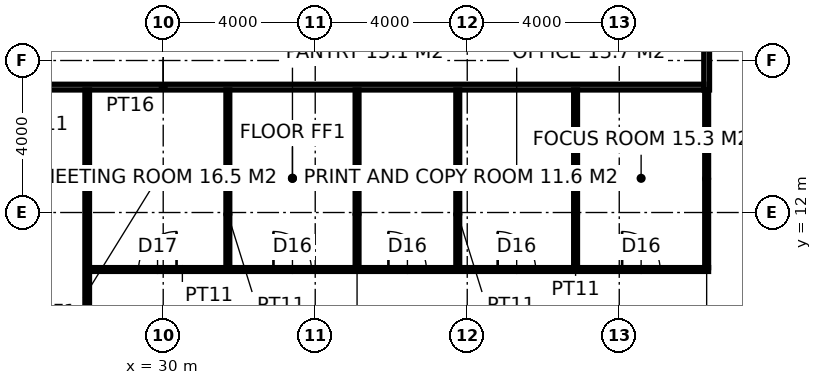
"""IFC4 building model, lengths in metres.
Left out: names, types, materials, properties, quantities, classifications, styles, units other than length and angle.
Written with IfcOpenShell. Run it as: python <this file> out.ifc"""

import sys

from ifc_helpers import new_model, si_unit, direction, frame, frame_2d, origin, place, context, subcontext, project, spatial, rectangle, extrude, element, fill, save


model = new_model("IFC4")
c1 = context("Model", 3, precision=1e-05, world=origin(), true_north=direction((0.0, 1.0)))
c2 = subcontext(c1, "Body", "Model", "MODEL_VIEW")
j1 = project(units=[si_unit("LENGTHUNIT", "METRE"), si_unit("PLANEANGLEUNIT", "RADIAN")], contexts=[c1])
p1 = place(None, origin())
s1 = spatial("IfcSite", under=j1, at=p1, CompositionType="ELEMENT")
p2 = place(p1, origin())
s2 = spatial("IfcBuilding", under=s1, at=p2, CompositionType="ELEMENT")
p3 = place(p2, frame((0.0, 0.0, 19.0)))
s3 = spatial("IfcBuildingStorey", under=s2, at=p3, CompositionType="ELEMENT", Elevation=19.0)
p4 = place(p3, frame((44.3, 15.225, 0.0), z_axis=(0.0, 0.0, 1.0), x_axis=(0.0, 1.0, 0.0)))
e1 = element("IfcWall", 1, at=p4, inside=s3, PredefinedType="PARTITIONING", context=c2, shape_type="SweptSolid", body=[
    extrude(rectangle(XDim=23.55, YDim=0.15, at=frame_2d((11.775, 0.0))), origin(), (0.0, 0.0, 1.0), 3.85),
])
p5 = place(p4, frame((5.575, 0.0, 0.0)))
e2 = element("IfcOpeningElement", 2, at=p5, cuts=e1, PredefinedType="OPENING", context=c2, shape_type="SweptSolid", body=[
    extrude(rectangle(XDim=1.8, YDim=2.4, at=frame_2d((0.9, 1.2))), frame((0.0, 0.085, 0.0), z_axis=(0.0, -1.0, 0.0), x_axis=(1.0, 0.0, 0.0)), (0.0, 0.0, 1.0), 0.17),
])
p6 = place(p4, frame((16.825, 0.0, 0.0)))
e3 = element("IfcOpeningElement", 3, at=p6, cuts=e1, PredefinedType="OPENING", context=c2, shape_type="SweptSolid", body=[
    extrude(rectangle(XDim=1.8, YDim=2.4, at=frame_2d((0.9, 1.2))), frame((0.0, 0.085, 0.0), z_axis=(0.0, -1.0, 0.0), x_axis=(1.0, 0.0, 0.0)), (0.0, 0.0, 1.0), 0.17),
])
p7 = place(p3, frame((15.775, 15.3, 0.0), z_axis=(0.0, 0.0, 1.0), x_axis=(1.0, 0.0, 0.0)))
e4 = element("IfcWall", 4, at=p7, inside=s3, PredefinedType="PARTITIONING", context=c2, shape_type="SweptSolid", body=[
    extrude(rectangle(XDim=28.45, YDim=0.15, at=frame_2d((14.225, 0.0))), origin(), (0.0, 0.0, 1.0), 3.85),
])
p8 = place(p3, frame((28.0, -3.7, 0.0), z_axis=(0.0, 0.0, 1.0), x_axis=(0.0, 1.0, 0.0)))
e5 = element("IfcWall", 5, at=p8, inside=s3, PredefinedType="PARTITIONING", context=c2, shape_type="SweptSolid", body=[
    extrude(rectangle(XDim=18.925, YDim=0.12, at=frame_2d((9.462, 0.0))), origin(), (0.0, 0.0, 1.0), 3.85),
])
p9 = place(p3, frame((28.061, 10.5, 0.0), z_axis=(0.0, 0.0, 1.0), x_axis=(1.0, 0.0, 0.0)))
e6 = element("IfcWall", 6, at=p9, inside=s3, PredefinedType="PARTITIONING", context=c2, shape_type="SweptSolid", body=[
    extrude(rectangle(XDim=16.289, YDim=0.1, at=frame_2d((8.145, 0.0))), origin(), (0.0, 0.0, 1.0), 3.85),
])
p10 = place(p9, frame((1.29, 0.0, 0.0)))
e7 = element("IfcOpeningElement", 7, at=p10, cuts=e6, PredefinedType="OPENING", context=c2, shape_type="SweptSolid", body=[
    extrude(rectangle(XDim=1.0, YDim=2.2, at=frame_2d((0.5, 1.1))), frame((0.0, 0.06, 0.0), z_axis=(0.0, -1.0, 0.0), x_axis=(1.0, 0.0, 0.0)), (0.0, 0.0, 1.0), 0.12),
])
p11 = place(p9, frame((4.84, 0.0, 0.0)))
e8 = element("IfcOpeningElement", 8, at=p11, cuts=e6, PredefinedType="OPENING", context=c2, shape_type="SweptSolid", body=[
    extrude(rectangle(XDim=1.0, YDim=2.2, at=frame_2d((0.5, 1.1))), frame((0.0, 0.06, 0.0), z_axis=(0.0, -1.0, 0.0), x_axis=(1.0, 0.0, 0.0)), (0.0, 0.0, 1.0), 0.12),
])
p12 = place(p9, frame((7.865, 0.0, 0.0)))
e9 = element("IfcOpeningElement", 9, at=p12, cuts=e6, PredefinedType="OPENING", context=c2, shape_type="SweptSolid", body=[
    extrude(rectangle(XDim=1.0, YDim=2.2, at=frame_2d((0.5, 1.1))), frame((0.0, 0.06, 0.0), z_axis=(0.0, -1.0, 0.0), x_axis=(1.0, 0.0, 0.0)), (0.0, 0.0, 1.0), 0.12),
])
p13 = place(p9, frame((10.74, 0.0, 0.0)))
e10 = element("IfcOpeningElement", 10, at=p13, cuts=e6, PredefinedType="OPENING", context=c2, shape_type="SweptSolid", body=[
    extrude(rectangle(XDim=1.0, YDim=2.2, at=frame_2d((0.5, 1.1))), frame((0.0, 0.06, 0.0), z_axis=(0.0, -1.0, 0.0), x_axis=(1.0, 0.0, 0.0)), (0.0, 0.0, 1.0), 0.12),
])
p14 = place(p9, frame((14.014, 0.0, 0.0)))
e11 = element("IfcOpeningElement", 11, at=p14, cuts=e6, PredefinedType="OPENING", context=c2, shape_type="SweptSolid", body=[
    extrude(rectangle(XDim=1.0, YDim=2.2, at=frame_2d((0.5, 1.1))), frame((0.0, 0.06, 0.0), z_axis=(0.0, -1.0, 0.0), x_axis=(1.0, 0.0, 0.0)), (0.0, 0.0, 1.0), 0.12),
])
for number, where, z_axis, x_axis in (
    (12, (31.701, 10.55, 0.0), (0.0, 0.0, 1.0), (0.0, 1.0, 0.0)),
    (13, (35.101, 10.55, 0.0), (0.0, 0.0, 1.0), (0.0, 1.0, 0.0)),
    (14, (37.751, 10.55, 0.0), (0.0, 0.0, 1.0), (0.0, 1.0, 0.0)),
    (15, (40.851, 10.55, 0.0), (0.0, 0.0, 1.0), (0.0, 1.0, 0.0)),
    (16, (44.3, 10.55, 0.0), (0.0, 0.0, 1.0), (0.0, 1.0, 0.0)),
):
    element("IfcWall", number, at=place(p3, frame(where, z_axis=z_axis, x_axis=x_axis)), inside=s3, PredefinedType="PARTITIONING", context=c2, shape_type="SweptSolid", body=[
        extrude(rectangle(XDim=4.675, YDim=0.1, at=frame_2d((2.337, 0.0))), origin(), (0.0, 0.0, 1.0), 3.85),
    ])
p15 = place(p10, origin())
e17 = element("IfcDoor", 17, at=p15, inside=s3, OperationType="SINGLE_SWING_RIGHT", PredefinedType="DOOR", context=c2, shape_type="SweptSolid", body=[
    extrude(rectangle(XDim=1.0, YDim=2.2, at=frame_2d((0.5, 1.1))), frame((0.0, 0.025, 0.0), z_axis=(0.0, -1.0, 0.0), x_axis=(1.0, 0.0, 0.0)), (0.0, 0.0, 1.0), 0.05),
])
fill(e7, e17)
p16 = place(p11, origin())
e18 = element("IfcDoor", 18, at=p16, inside=s3, OperationType="SINGLE_SWING_LEFT", PredefinedType="DOOR", context=c2, shape_type="SweptSolid", body=[
    extrude(rectangle(XDim=1.0, YDim=2.2, at=frame_2d((0.5, 1.1))), frame((0.0, 0.025, 0.0), z_axis=(0.0, -1.0, 0.0), x_axis=(1.0, 0.0, 0.0)), (0.0, 0.0, 1.0), 0.05),
])
fill(e8, e18)
p17 = place(p12, origin())
e19 = element("IfcDoor", 19, at=p17, inside=s3, OperationType="SINGLE_SWING_LEFT", PredefinedType="DOOR", context=c2, shape_type="SweptSolid", body=[
    extrude(rectangle(XDim=1.0, YDim=2.2, at=frame_2d((0.5, 1.1))), frame((0.0, 0.025, 0.0), z_axis=(0.0, -1.0, 0.0), x_axis=(1.0, 0.0, 0.0)), (0.0, 0.0, 1.0), 0.05),
])
fill(e9, e19)
p18 = place(p13, origin())
e20 = element("IfcDoor", 20, at=p18, inside=s3, OperationType="SINGLE_SWING_LEFT", PredefinedType="DOOR", context=c2, shape_type="SweptSolid", body=[
    extrude(rectangle(XDim=1.0, YDim=2.2, at=frame_2d((0.5, 1.1))), frame((0.0, 0.025, 0.0), z_axis=(0.0, -1.0, 0.0), x_axis=(1.0, 0.0, 0.0)), (0.0, 0.0, 1.0), 0.05),
])
fill(e10, e20)
p19 = place(p14, origin())
e21 = element("IfcDoor", 21, at=p19, inside=s3, OperationType="SINGLE_SWING_LEFT", PredefinedType="DOOR", context=c2, shape_type="SweptSolid", body=[
    extrude(rectangle(XDim=1.0, YDim=2.2, at=frame_2d((0.5, 1.1))), frame((0.0, 0.025, 0.0), z_axis=(0.0, -1.0, 0.0), x_axis=(1.0, 0.0, 0.0)), (0.0, 0.0, 1.0), 0.05),
])
fill(e11, e21)
save(model, sys.argv[1])
